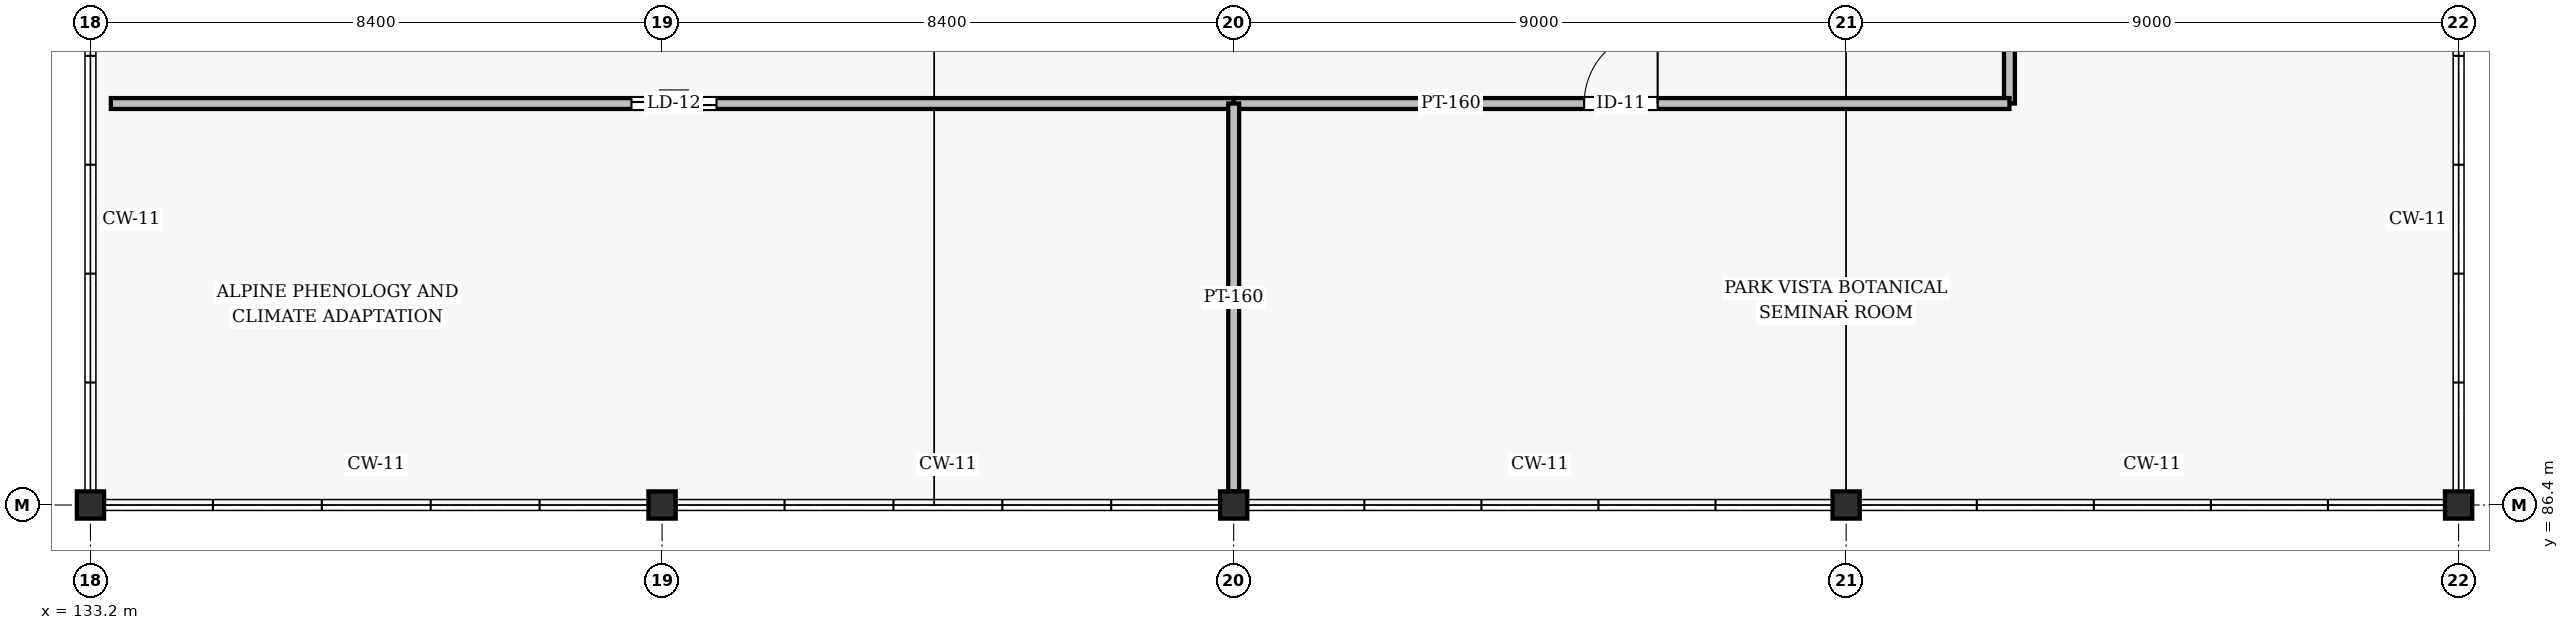
"""IFC4 building model, lengths in metres.
Left out: names, types, materials, properties, quantities, classifications, styles, units other than length and angle.
Written with IfcOpenShell. Run it as: python <this file> out.ifc"""

import sys

from ifc_helpers import new_model, si_unit, direction, frame, frame_2d, origin, origin_2d, place, context, subcontext, project, spatial, rectangle, hollow_rectangle, extrude, element, fill, save


model = new_model("IFC4")
c1 = context("Model", 3, precision=1e-05, world=origin(), true_north=direction((0.0, 1.0)))
c2 = subcontext(c1, "Body", "Model", "MODEL_VIEW")
j1 = project(units=[si_unit("LENGTHUNIT", "METRE"), si_unit("PLANEANGLEUNIT", "RADIAN")], contexts=[c1])
p1 = place(None, origin())
s1 = spatial("IfcSite", under=j1, at=p1, CompositionType="ELEMENT")
p2 = place(p1, origin())
s2 = spatial("IfcBuilding", under=s1, at=p2, CompositionType="ELEMENT")
p3 = place(p2, frame((0.0, 0.0, 54.0)))
s3 = spatial("IfcBuildingStorey", under=s2, at=p3, CompositionType="ELEMENT", Elevation=54.0)
p4 = place(p3, frame((133.2, 86.4, 0.0), z_axis=(0.0, 0.0, 1.0), x_axis=(1.0, 0.0, 0.0)))
e1 = element("IfcColumn", 1, at=p4, inside=s3, PredefinedType="COLUMN", context=c2, shape_type="SweptSolid", body=[
    extrude(hollow_rectangle(XDim=0.4, YDim=0.4, WallThickness=0.016, InnerFilletRadius=0.016, OuterFilletRadius=0.032, at=origin_2d()), origin(), (0.0, 0.0, 1.0), 3.576),
])
for number, where, z_axis, x_axis in (
    (2, (141.6, 86.4, 0.0), (0.0, 0.0, 1.0), (1.0, 0.0, 0.0)),
    (3, (150.0, 86.4, 0.0), (0.0, 0.0, 1.0), (1.0, 0.0, 0.0)),
    (4, (159.0, 86.4, 0.0), (0.0, 0.0, 1.0), (1.0, 0.0, 0.0)),
    (5, (168.0, 86.4, 0.0), (0.0, 0.0, 1.0), (1.0, 0.0, 0.0)),
):
    element("IfcColumn", number, at=place(p3, frame(where, z_axis=z_axis, x_axis=x_axis)), inside=s3, PredefinedType="COLUMN", context=c2, shape_type="SweptSolid", body=[
        extrude(hollow_rectangle(XDim=0.4, YDim=0.4, WallThickness=0.016, InnerFilletRadius=0.016, OuterFilletRadius=0.032, at=origin_2d()), origin(), (0.0, 0.0, 1.0), 3.6),
    ])
p5 = place(p3, frame((161.4, 92.3, 0.0), z_axis=(0.0, 0.0, 1.0), x_axis=(0.0, 1.0, 0.0)))
e6 = element("IfcWall", 6, at=p5, inside=s3, PredefinedType="PARTITIONING", context=c2, shape_type="SweptSolid", body=[
    extrude(rectangle(XDim=14.1, YDim=0.16, at=frame_2d((7.05, 0.0))), origin(), (0.0, 0.0, 1.0), 2.748),
])
p6 = place(p5, frame((6.5, 0.0, 0.0)))
e7 = element("IfcOpeningElement", 7, at=p6, cuts=e6, PredefinedType="OPENING", context=c2, shape_type="SweptSolid", body=[
    extrude(rectangle(XDim=1.08, YDim=2.08, at=frame_2d((0.54, 1.04))), frame((0.0, 0.09, 0.0), z_axis=(0.0, -1.0, 0.0), x_axis=(1.0, 0.0, 0.0)), (0.0, 0.0, 1.0), 0.18),
])
p7 = place(p3, frame((133.5, 92.3, 0.0), z_axis=(0.0, 0.0, 1.0), x_axis=(1.0, 0.0, 0.0)))
e8 = element("IfcWall", 8, at=p7, inside=s3, PredefinedType="PARTITIONING", context=c2, shape_type="SweptSolid", body=[
    extrude(rectangle(XDim=16.5, YDim=0.16, at=frame_2d((8.25, 0.0))), origin(), (0.0, 0.0, 1.0), 3.344),
])
p8 = place(p7, frame((7.65, 0.0, 0.0)))
e9 = element("IfcOpeningElement", 9, at=p8, cuts=e8, PredefinedType="OPENING", context=c2, shape_type="SweptSolid", body=[
    extrude(rectangle(XDim=1.25, YDim=2.12, at=frame_2d((0.625, 1.06))), frame((0.0, 0.09, 0.0), z_axis=(0.0, -1.0, 0.0), x_axis=(1.0, 0.0, 0.0)), (0.0, 0.0, 1.0), 0.18),
])
p9 = place(p3, frame((150.0, 92.3, 0.0), z_axis=(0.0, 0.0, 1.0), x_axis=(1.0, 0.0, 0.0)))
e10 = element("IfcWall", 10, at=p9, inside=s3, PredefinedType="PARTITIONING", context=c2, shape_type="SweptSolid", body=[
    extrude(rectangle(XDim=11.4, YDim=0.16, at=frame_2d((5.7, 0.0))), origin(), (0.0, 0.0, 1.0), 2.844),
])
p10 = place(p9, frame((5.15, 0.0, 0.0)))
e11 = element("IfcOpeningElement", 11, at=p10, cuts=e10, PredefinedType="OPENING", context=c2, shape_type="SweptSolid", body=[
    extrude(rectangle(XDim=1.08, YDim=2.08, at=frame_2d((0.54, 1.04))), frame((0.0, 0.09, 0.0), z_axis=(0.0, -1.0, 0.0), x_axis=(1.0, 0.0, 0.0)), (0.0, 0.0, 1.0), 0.18),
])
p11 = place(p3, frame((150.0, 86.6, 0.0), z_axis=(0.0, 0.0, 1.0), x_axis=(0.0, 1.0, 0.0)))
e12 = element("IfcWall", 12, at=p11, inside=s3, PredefinedType="PARTITIONING", context=c2, shape_type="SweptSolid", body=[
    extrude(rectangle(XDim=5.7, YDim=0.16, at=frame_2d((2.85, 0.0))), origin(), (0.0, 0.0, 1.0), 2.844),
])
p12 = place(p8, origin())
e13 = element("IfcDoor", 13, at=p12, inside=s3, OperationType="SINGLE_SWING_LEFT", PredefinedType="DOOR", context=c2, shape_type="SweptSolid", body=[
    extrude(rectangle(XDim=1.25, YDim=2.12, at=frame_2d((0.625, 1.06))), frame((0.0, 0.025, 0.0), z_axis=(0.0, -1.0, 0.0), x_axis=(1.0, 0.0, 0.0)), (0.0, 0.0, 1.0), 0.05),
])
fill(e9, e13)
p13 = place(p10, origin())
e14 = element("IfcDoor", 14, at=p13, inside=s3, OperationType="SINGLE_SWING_RIGHT", PredefinedType="DOOR", context=c2, shape_type="SweptSolid", body=[
    extrude(rectangle(XDim=1.08, YDim=2.08, at=frame_2d((0.54, 1.04))), frame((0.0, 0.025, 0.0), z_axis=(0.0, -1.0, 0.0), x_axis=(1.0, 0.0, 0.0)), (0.0, 0.0, 1.0), 0.05),
])
fill(e11, e14)
save(model, sys.argv[1])
